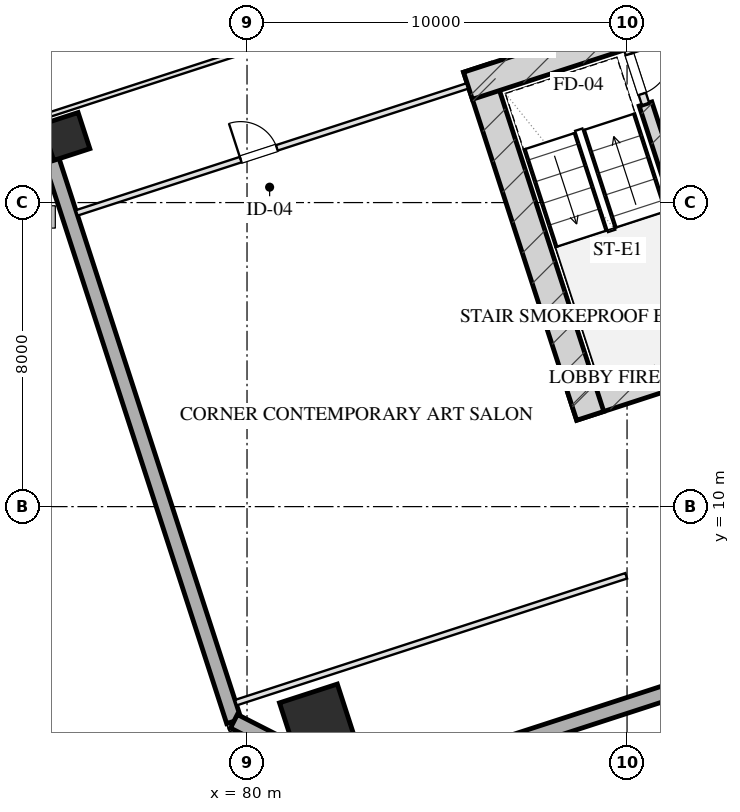
"""IFC4 building model, lengths in metres.
Left out: names, types, materials, properties, quantities, classifications, styles, units other than length and angle.
Written with IfcOpenShell. Run it as: python <this file> out.ifc"""

import sys

from ifc_helpers import new_model, si_unit, direction, frame, frame_2d, origin, origin_2d, place, context, subcontext, project, spatial, rectangle, hollow_rectangle, extrude, element, fill, save


model = new_model("IFC4")
c1 = context("Model", 3, precision=1e-05, world=origin(), true_north=direction((0.0, 1.0)))
c2 = subcontext(c1, "Body", "Model", "MODEL_VIEW")
j1 = project(units=[si_unit("LENGTHUNIT", "METRE"), si_unit("PLANEANGLEUNIT", "RADIAN")], contexts=[c1])
p1 = place(None, origin())
s1 = spatial("IfcSite", under=j1, at=p1, CompositionType="ELEMENT")
p2 = place(p1, origin())
s2 = spatial("IfcBuilding", under=s1, at=p2, CompositionType="ELEMENT")
p3 = place(p2, frame((0.0, 0.0, 57.5)))
s3 = spatial("IfcBuildingStorey", under=s2, at=p3, CompositionType="ELEMENT", Elevation=57.5)
p4 = place(p3, frame((88.559, 12.629, 0.0), z_axis=(0.0, 0.0, 1.0), x_axis=(0.951056072937, 0.309018358888, 0.0)))
e1 = element("IfcWall", 1, at=p4, inside=s3, PredefinedType="SHEAR", context=c2, shape_type="SweptSolid", body=[
    extrude(rectangle(XDim=16.55, YDim=0.75, at=frame_2d((8.275, 0.0))), origin(), (0.0, 0.0, 1.0), 3.45),
])
p5 = place(p3, frame((86.055, 21.546, 0.0), z_axis=(0.0, 0.0, 1.0), x_axis=(0.309023585745, -0.951054374604, 0.0)))
e2 = element("IfcWall", 2, at=p5, inside=s3, PredefinedType="SHEAR", context=c2, shape_type="SweptSolid", body=[
    extrude(rectangle(XDim=9.63, YDim=0.75, at=frame_2d((4.815, 0.0))), origin(), (0.0, 0.0, 1.0), 3.45),
])
p6 = place(p3, frame((90.486, 20.594, 0.0), z_axis=(0.0, 0.0, 1.0), x_axis=(0.309020428229, -0.951055400562, 0.0)))
e3 = element("IfcWall", 3, at=p6, inside=s3, PredefinedType="SHEAR", context=c2, shape_type="SweptSolid", body=[
    extrude(rectangle(XDim=6.98, YDim=0.35, at=frame_2d((3.49, 0.0))), origin(), (0.0, 0.0, 1.0), 3.45),
])
p7 = place(p3, frame((85.814, 21.074, 0.0), z_axis=(0.0, 0.0, 1.0), x_axis=(0.95106580992, 0.308988390074, 0.0)))
e4 = element("IfcWall", 4, at=p7, inside=s3, PredefinedType="SHEAR", context=c2, shape_type="SweptSolid", body=[
    extrude(rectangle(XDim=4.295, YDim=0.75, at=frame_2d((2.147, 0.0))), origin(), (0.0, 0.0, 1.0), 3.45),
])
p8 = place(p3, frame((81.863, 4.323, 0.0), z_axis=(0.0, 0.0, 1.0), x_axis=(0.951056516295, 0.309016994375, 0.0)))
e5 = element("IfcColumn", 5, at=p8, inside=s3, PredefinedType="COLUMN", context=c2, shape_type="SweptSolid", body=[
    extrude(hollow_rectangle(XDim=1.6, YDim=1.6, WallThickness=0.055, at=origin_2d()), origin(), (0.0, 0.0, 1.0), 3.451),
])
p9 = place(p3, frame((75.234, 19.739, 0.0), z_axis=(0.0, 0.0, 1.0), x_axis=(0.951056516295, 0.309016994375, 0.0)))
e6 = element("IfcColumn", 6, at=p9, inside=s3, PredefinedType="COLUMN", context=c2, shape_type="SweptSolid", body=[
    extrude(hollow_rectangle(XDim=1.0, YDim=1.0, WallThickness=0.036, at=origin_2d()), origin(), (0.0, 0.0, 1.0), 3.451),
])
p10 = place(p3, frame((79.655, 4.352, 0.0), z_axis=(0.0, 0.0, 1.0), x_axis=(-0.309014526607, 0.951057318118, 0.0)))
e7 = element("IfcWall", 7, at=p10, inside=s3, PredefinedType="SOLIDWALL", context=c2, shape_type="SweptSolid", body=[
    extrude(rectangle(XDim=50.0, YDim=0.4, at=frame_2d((25.0, 0.0))), origin(), (0.0, 0.0, 1.0), 2.61),
])
p11 = place(p10, frame((17.35, 0.0, 0.75)))
e8 = element("IfcOpeningElement", 8, at=p11, cuts=e7, PredefinedType="OPENING", context=c2, shape_type="SweptSolid", body=[
    extrude(rectangle(XDim=2.5, YDim=1.46, at=frame_2d((1.25, 0.73))), frame((0.0, 0.21, 0.0), z_axis=(0.0, -1.0, 0.0), x_axis=(1.0, 0.0, 0.0)), (0.0, 0.0, 1.0), 0.42),
])
p12 = place(p10, frame((30.25, 0.0, 0.0)))
e9 = element("IfcOpeningElement", 9, at=p12, cuts=e7, PredefinedType="OPENING", context=c2, shape_type="SweptSolid", body=[
    extrude(rectangle(XDim=1.1, YDim=2.15, at=frame_2d((0.55, 1.075))), frame((0.0, 0.21, 0.0), z_axis=(0.0, -1.0, 0.0), x_axis=(1.0, 0.0, 0.0)), (0.0, 0.0, 1.0), 0.42),
])
p13 = place(p3, frame((113.998, 12.567, 0.0), z_axis=(0.0, 0.0, 1.0), x_axis=(-0.951055939317, -0.309018770125, 0.0)))
e10 = element("IfcWall", 10, at=p13, inside=s3, PredefinedType="SOLIDWALL", context=c2, shape_type="SweptSolid", body=[
    extrude(rectangle(XDim=32.4, YDim=0.4, at=frame_2d((16.2, 0.0))), origin(), (0.0, 0.0, 1.0), 2.61),
])
p14 = place(p3, frame((83.184, 2.554, 0.0), z_axis=(0.0, 0.0, 1.0), x_axis=(-0.890998089617, 0.454007053137, 0.0)))
e11 = element("IfcWall", 11, at=p14, inside=s3, PredefinedType="SOLIDWALL", context=c2, shape_type="SweptSolid", body=[
    extrude(rectangle(XDim=3.96, YDim=0.4, at=frame_2d((1.98, 0.0))), origin(), (0.0, 0.0, 1.0), 2.61),
])
p15 = place(p3, frame((89.899, 22.401, 0.0), z_axis=(0.0, 0.0, 1.0), x_axis=(0.308932062672, -0.951084108086, 0.0)))
e12 = element("IfcWall", 12, at=p15, inside=s3, PredefinedType="PARTITIONING", context=c2, shape_type="SweptSolid", body=[
    extrude(rectangle(XDim=1.9, YDim=0.2, at=frame_2d((0.95, 0.0))), origin(), (0.0, 0.0, 1.0), 3.175),
])
p16 = place(p15, frame((0.52, 0.0, 0.0)))
e13 = element("IfcOpeningElement", 13, at=p16, cuts=e12, PredefinedType="OPENING", context=c2, shape_type="SweptSolid", body=[
    extrude(rectangle(XDim=1.1, YDim=2.05, at=frame_2d((0.55, 1.025))), frame((0.0, 0.11, 0.0), z_axis=(0.0, -1.0, 0.0), x_axis=(1.0, 0.0, 0.0)), (0.0, 0.0, 1.0), 0.22),
])
p17 = place(p3, frame((79.707, 4.842, 0.0), z_axis=(0.0, 0.0, 1.0), x_axis=(0.951056658866, 0.309016555588, 0.0)))
e14 = element("IfcWall", 14, at=p17, inside=s3, PredefinedType="PARTITIONING", context=c2, shape_type="SweptSolid", body=[
    extrude(rectangle(XDim=10.8, YDim=0.15, at=frame_2d((5.4, 0.0))), origin(), (0.0, 0.0, 1.0), 3.175),
])
p18 = place(p3, frame((75.519, 17.729, 0.0), z_axis=(0.0, 0.0, 1.0), x_axis=(0.951056658866, 0.309016555588, 0.0)))
e15 = element("IfcWall", 15, at=p18, inside=s3, PredefinedType="PARTITIONING", context=c2, shape_type="SweptSolid", body=[
    extrude(rectangle(XDim=10.8, YDim=0.15, at=frame_2d((5.4, 0.0))), origin(), (0.0, 0.0, 1.0), 3.175),
])
p19 = place(p18, frame((4.536, 0.0, 0.0)))
e16 = element("IfcOpeningElement", 16, at=p19, cuts=e15, PredefinedType="OPENING", context=c2, shape_type="SweptSolid", body=[
    extrude(rectangle(XDim=1.0, YDim=2.05, at=frame_2d((0.5, 1.025))), frame((0.0, 0.085, 0.0), z_axis=(0.0, -1.0, 0.0), x_axis=(1.0, 0.0, 0.0)), (0.0, 0.0, 1.0), 0.17),
])
p20 = place(p3, frame((74.691, 20.278, 0.0), z_axis=(0.0, 0.0, 1.0), x_axis=(0.951054756643, 0.309022409974, 0.0)))
e17 = element("IfcWall", 17, at=p20, inside=s3, PredefinedType="PARTITIONING", context=c2, shape_type="SweptSolid", body=[
    extrude(rectangle(XDim=15.175, YDim=0.12, at=frame_2d((7.587, 0.0))), origin(), (0.0, 0.0, 1.0), 3.175),
])
p21 = place(p16, origin())
e18 = element("IfcDoor", 18, at=p21, inside=s3, OperationType="SINGLE_SWING_LEFT", PredefinedType="DOOR", context=c2, shape_type="SweptSolid", body=[
    extrude(rectangle(XDim=1.1, YDim=2.05, at=frame_2d((0.55, 1.025))), frame((0.0, 0.025, 0.0), z_axis=(0.0, -1.0, 0.0), x_axis=(1.0, 0.0, 0.0)), (0.0, 0.0, 1.0), 0.05),
])
fill(e13, e18)
p22 = place(p19, origin())
e19 = element("IfcDoor", 19, at=p22, inside=s3, OperationType="SINGLE_SWING_LEFT", PredefinedType="DOOR", context=c2, shape_type="SweptSolid", body=[
    extrude(rectangle(XDim=1.0, YDim=2.05, at=frame_2d((0.5, 1.025))), frame((0.0, 0.025, 0.0), z_axis=(0.0, -1.0, 0.0), x_axis=(1.0, 0.0, 0.0)), (0.0, 0.0, 1.0), 0.05),
])
fill(e16, e19)
save(model, sys.argv[1])
